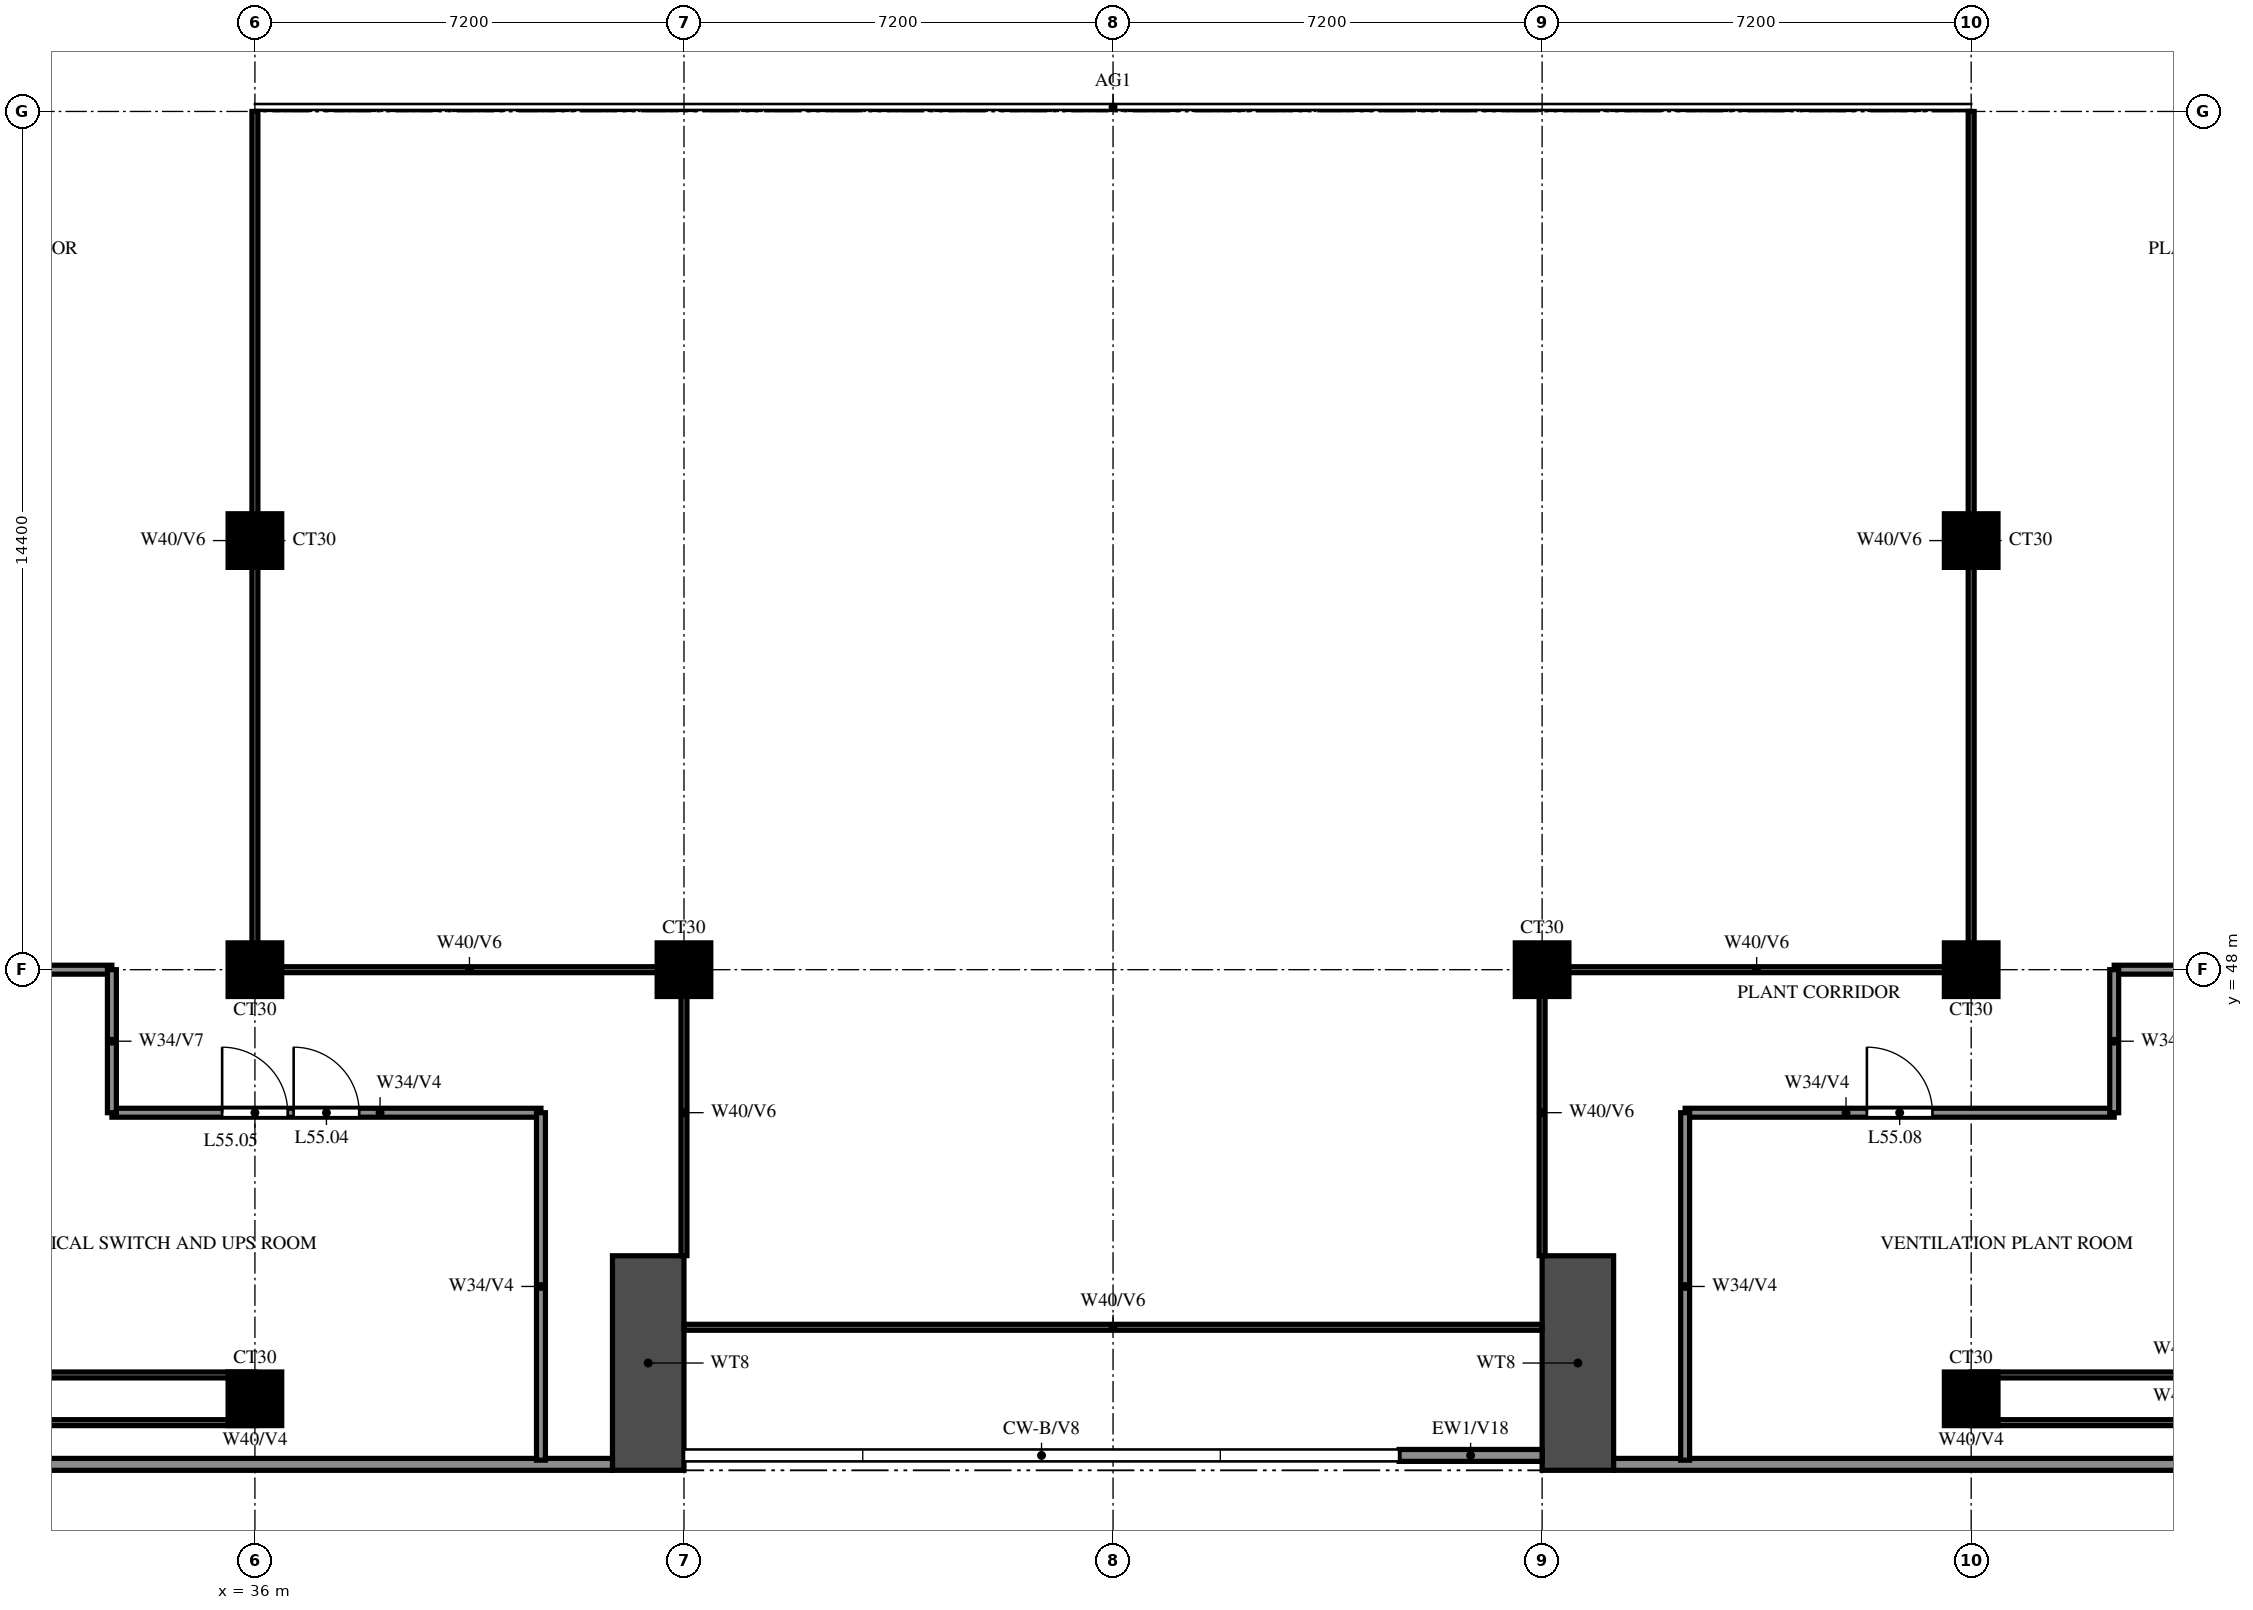
"""IFC4 building model, lengths in metres.
Left out: names, types, materials, properties, quantities, classifications, styles, units other than length and angle.
Written with IfcOpenShell. Run it as: python <this file> out.ifc"""

import sys

from ifc_helpers import new_model, si_unit, direction, frame, frame_2d, origin, origin_2d, place, context, subcontext, project, spatial, rectangle, extrude, source, transform, mapped, element, fill, save


model = new_model("IFC4")
c1 = context("Model", 3, precision=1e-05, world=origin(), true_north=direction((0.0, 1.0)))
c2 = subcontext(c1, "Body", "Model", "MODEL_VIEW")
j1 = project(units=[si_unit("LENGTHUNIT", "METRE"), si_unit("PLANEANGLEUNIT", "RADIAN")], contexts=[c1])
p1 = place(None, origin())
s1 = spatial("IfcSite", under=j1, at=p1, CompositionType="ELEMENT")
p2 = place(p1, origin())
s2 = spatial("IfcBuilding", under=s1, at=p2, CompositionType="ELEMENT")
p3 = place(p2, frame((0.0, 0.0, 206.0)))
s3 = spatial("IfcBuildingStorey", under=s2, at=p3, CompositionType="ELEMENT", Elevation=206.0)
m1 = source(origin(), c2, "Body", "SweptSolid", [
    extrude(rectangle(XDim=0.9, YDim=0.9, at=origin_2d()), origin(), (0.0, 0.0, 1.0), 5.22),
])
for number, where, z_axis, x_axis in (
    (1, (36.0, 40.8, 0.0), (0.0, 0.0, 1.0), (1.0, 0.0, 0.0)),
    (2, (64.8, 40.8, 0.0), (0.0, 0.0, 1.0), (1.0, 0.0, 0.0)),
    (3, (36.0, 48.0, 0.0), (0.0, 0.0, 1.0), (1.0, 0.0, 0.0)),
    (4, (43.2, 48.0, 0.0), (0.0, 0.0, 1.0), (1.0, 0.0, 0.0)),
    (5, (57.6, 48.0, 0.0), (0.0, 0.0, 1.0), (1.0, 0.0, 0.0)),
    (6, (64.8, 48.0, 0.0), (0.0, 0.0, 1.0), (1.0, 0.0, 0.0)),
    (7, (36.0, 55.2, 0.0), (0.0, 0.0, 1.0), (1.0, 0.0, 0.0)),
    (8, (64.8, 55.2, 0.0), (0.0, 0.0, 1.0), (1.0, 0.0, 0.0)),
):
    element("IfcColumn", number, at=place(p3, frame(where, z_axis=z_axis, x_axis=x_axis)), inside=s3, PredefinedType="COLUMN", context=c2, shape_type="MappedRepresentation", body=[
        mapped(m1, transform((0.0, 0.0, 0.0))),
    ])
for number, where, z_axis, x_axis in (
    (9, (42.6, 39.6, 0.0), (0.0, 0.0, 1.0), (0.0, 1.0, 0.0)),
    (10, (58.2, 39.6, 0.0), (0.0, 0.0, 1.0), (0.0, 1.0, 0.0)),
):
    element("IfcWall", number, at=place(p3, frame(where, z_axis=z_axis, x_axis=x_axis)), inside=s3, PredefinedType="SHEAR", context=c2, shape_type="SweptSolid", body=[
        extrude(rectangle(XDim=3.6, YDim=1.2, at=frame_2d((1.8, 0.0))), origin(), (0.0, 0.0, 1.0), 5.22),
    ])
p4 = place(p3, frame((18.2, 39.7, 0.0), z_axis=(0.0, 0.0, 1.0), x_axis=(1.0, 0.0, 0.0)))
e11 = element("IfcWall", 11, at=p4, inside=s3, PredefinedType="SOLIDWALL", context=c2, shape_type="SweptSolid", body=[
    extrude(rectangle(XDim=23.8, YDim=0.2, at=frame_2d((11.9, 0.0))), origin(), (0.0, 0.0, 1.0), 5.22),
])
p5 = place(p3, frame((58.8, 39.7, 0.0), z_axis=(0.0, 0.0, 1.0), x_axis=(1.0, 0.0, 0.0)))
e12 = element("IfcWall", 12, at=p5, inside=s3, PredefinedType="SOLIDWALL", context=c2, shape_type="SweptSolid", body=[
    extrude(rectangle(XDim=23.583, YDim=0.2, at=frame_2d((11.792, 0.0))), origin(), (0.0, 0.0, 1.0), 5.22),
])
p6 = place(p3, frame((55.2, 39.85, 0.0), z_axis=(0.0, 0.0, 1.0), x_axis=(1.0, 0.0, 0.0)))
e13 = element("IfcWall", 13, at=p6, inside=s3, PredefinedType="SOLIDWALL", context=c2, shape_type="SweptSolid", body=[
    extrude(rectangle(XDim=2.4, YDim=0.2, at=frame_2d((1.2, 0.0))), origin(), (0.0, 0.0, 1.0), 4.02),
])
p7 = place(p3, frame((21.6, 40.4, 0.0), z_axis=(0.0, 0.0, 1.0), x_axis=(1.0, 0.0, 0.0)))
e14 = element("IfcWall", 14, at=p7, inside=s3, PredefinedType="PARTITIONING", context=c2, shape_type="SweptSolid", body=[
    extrude(rectangle(XDim=14.4, YDim=0.1, at=frame_2d((7.2, 0.0))), origin(), (0.0, 0.0, 1.0), 3.72),
])
p8 = place(p3, frame((64.8, 40.4, 0.0), z_axis=(0.0, 0.0, 1.0), x_axis=(1.0, 0.0, 0.0)))
e15 = element("IfcWall", 15, at=p8, inside=s3, PredefinedType="PARTITIONING", context=c2, shape_type="SweptSolid", body=[
    extrude(rectangle(XDim=7.2, YDim=0.1, at=frame_2d((3.6, 0.0))), origin(), (0.0, 0.0, 1.0), 5.22),
])
p9 = place(p3, frame((21.6, 41.2, 0.0), z_axis=(0.0, 0.0, 1.0), x_axis=(1.0, 0.0, 0.0)))
e16 = element("IfcWall", 16, at=p9, inside=s3, PredefinedType="PARTITIONING", context=c2, shape_type="SweptSolid", body=[
    extrude(rectangle(XDim=14.4, YDim=0.1, at=frame_2d((7.2, 0.0))), origin(), (0.0, 0.0, 1.0), 3.72),
])
p10 = place(p3, frame((64.8, 41.2, 0.0), z_axis=(0.0, 0.0, 1.0), x_axis=(1.0, 0.0, 0.0)))
e17 = element("IfcWall", 17, at=p10, inside=s3, PredefinedType="PARTITIONING", context=c2, shape_type="SweptSolid", body=[
    extrude(rectangle(XDim=7.2, YDim=0.1, at=frame_2d((3.6, 0.0))), origin(), (0.0, 0.0, 1.0), 3.72),
])
p11 = place(p3, frame((43.202, 42.0, 0.0), z_axis=(0.0, 0.0, 1.0), x_axis=(1.0, 0.0, 0.0)))
e18 = element("IfcWall", 18, at=p11, inside=s3, PredefinedType="PARTITIONING", context=c2, shape_type="SweptSolid", body=[
    extrude(rectangle(XDim=14.396, YDim=0.1, at=frame_2d((7.198, 0.0))), origin(), (0.0, 0.0, 1.0), 4.32),
])
p12 = place(p3, frame((33.6, 45.6, 0.0), z_axis=(0.0, 0.0, 1.0), x_axis=(1.0, 0.0, 0.0)))
e19 = element("IfcWall", 19, at=p12, inside=s3, PredefinedType="PARTITIONING", context=c2, shape_type="SweptSolid", body=[
    extrude(rectangle(XDim=7.2, YDim=0.15, at=frame_2d((3.6, 0.0))), origin(), (0.0, 0.0, 1.0), 5.22),
])
p13 = place(p12, frame((3.05, 0.0, 0.0)))
e20 = element("IfcOpeningElement", 20, at=p13, cuts=e19, PredefinedType="OPENING", context=c2, shape_type="SweptSolid", body=[
    extrude(rectangle(XDim=1.1, YDim=2.1, at=frame_2d((0.55, 1.05))), frame((0.0, 0.085, 0.0), z_axis=(0.0, -1.0, 0.0), x_axis=(1.0, 0.0, 0.0)), (0.0, 0.0, 1.0), 0.17),
])
p14 = place(p12, frame((1.85, 0.0, 0.0)))
e21 = element("IfcOpeningElement", 21, at=p14, cuts=e19, PredefinedType="OPENING", context=c2, shape_type="SweptSolid", body=[
    extrude(rectangle(XDim=1.1, YDim=2.1, at=frame_2d((0.55, 1.05))), frame((0.0, 0.085, 0.0), z_axis=(0.0, -1.0, 0.0), x_axis=(1.0, 0.0, 0.0)), (0.0, 0.0, 1.0), 0.17),
])
p15 = place(p3, frame((60.0, 45.6, 0.0), z_axis=(0.0, 0.0, 1.0), x_axis=(1.0, 0.0, 0.0)))
e22 = element("IfcWall", 22, at=p15, inside=s3, PredefinedType="PARTITIONING", context=c2, shape_type="SweptSolid", body=[
    extrude(rectangle(XDim=7.2, YDim=0.15, at=frame_2d((3.6, 0.0))), origin(), (0.0, 0.0, 1.0), 5.22),
])
p16 = place(p15, frame((3.05, 0.0, 0.0)))
e23 = element("IfcOpeningElement", 23, at=p16, cuts=e22, PredefinedType="OPENING", context=c2, shape_type="SweptSolid", body=[
    extrude(rectangle(XDim=1.1, YDim=2.1, at=frame_2d((0.55, 1.05))), frame((0.0, 0.085, 0.0), z_axis=(0.0, -1.0, 0.0), x_axis=(1.0, 0.0, 0.0)), (0.0, 0.0, 1.0), 0.17),
])
for number, where, z_axis, x_axis in (
    (24, (36.0, 48.0, 0.0), (0.0, 0.0, 1.0), (1.0, 0.0, 0.0)),
    (25, (57.6, 48.0, 0.0), (0.0, 0.0, 1.0), (1.0, 0.0, 0.0)),
):
    element("IfcWall", number, at=place(p3, frame(where, z_axis=z_axis, x_axis=x_axis)), inside=s3, PredefinedType="PARTITIONING", context=c2, shape_type="SweptSolid", body=[
        extrude(rectangle(XDim=7.2, YDim=0.1, at=frame_2d((3.6, 0.0))), origin(), (0.0, 0.0, 1.0), 4.32),
    ])
p17 = place(p3, frame((15.4, 48.0, 0.0), z_axis=(0.0, 0.0, 1.0), x_axis=(1.0, 0.0, 0.0)))
e26 = element("IfcWall", 26, at=p17, inside=s3, PredefinedType="PARTITIONING", context=c2, shape_type="SweptSolid", body=[
    extrude(rectangle(XDim=18.2, YDim=0.15, at=frame_2d((9.1, 0.0))), origin(), (0.0, 0.0, 1.0), 3.72),
])
p18 = place(p17, frame((4.5, 0.0, 0.0)))
e27 = element("IfcOpeningElement", 27, at=p18, cuts=e26, PredefinedType="OPENING", context=c2, shape_type="SweptSolid", body=[
    extrude(rectangle(XDim=1.1, YDim=2.1, at=frame_2d((0.55, 1.05))), frame((0.0, 0.085, 0.0), z_axis=(0.0, -1.0, 0.0), x_axis=(1.0, 0.0, 0.0)), (0.0, 0.0, 1.0), 0.17),
])
p19 = place(p3, frame((67.2, 48.0, 0.0), z_axis=(0.0, 0.0, 1.0), x_axis=(1.0, 0.0, 0.0)))
e28 = element("IfcWall", 28, at=p19, inside=s3, PredefinedType="PARTITIONING", context=c2, shape_type="SweptSolid", body=[
    extrude(rectangle(XDim=4.63, YDim=0.15, at=frame_2d((2.315, 0.0))), origin(), (0.0, 0.0, 1.0), 5.22),
])
p20 = place(p3, frame((33.6, 45.6, 0.0), z_axis=(0.0, 0.0, 1.0), x_axis=(0.0, 1.0, 0.0)))
e29 = element("IfcWall", 29, at=p20, inside=s3, PredefinedType="PARTITIONING", context=c2, shape_type="SweptSolid", body=[
    extrude(rectangle(XDim=2.4, YDim=0.15, at=frame_2d((1.2, 0.0))), origin(), (0.0, 0.0, 1.0), 4.32),
])
p21 = place(p3, frame((36.0, 40.4, 0.0), z_axis=(0.0, 0.0, 1.0), x_axis=(0.0, 1.0, 0.0)))
e30 = element("IfcWall", 30, at=p21, inside=s3, PredefinedType="PARTITIONING", context=c2, shape_type="SweptSolid", body=[
    extrude(rectangle(XDim=0.8, YDim=0.1, at=frame_2d((0.4, 0.0))), origin(), (0.0, 0.0, 1.0), 5.22),
])
p22 = place(p3, frame((36.0, 48.0, 0.0), z_axis=(0.0, 0.0, 1.0), x_axis=(0.0, 1.0, 0.0)))
e31 = element("IfcWall", 31, at=p22, inside=s3, PredefinedType="PARTITIONING", context=c2, shape_type="SweptSolid", body=[
    extrude(rectangle(XDim=14.4, YDim=0.1, at=frame_2d((7.2, 0.0))), origin(), (0.0, 0.0, 1.0), 4.32),
])
p23 = place(p3, frame((40.8, 39.77, 0.0), z_axis=(0.0, 0.0, 1.0), x_axis=(0.0, 1.0, 0.0)))
e32 = element("IfcWall", 32, at=p23, inside=s3, PredefinedType="PARTITIONING", context=c2, shape_type="SweptSolid", body=[
    extrude(rectangle(XDim=5.83, YDim=0.15, at=frame_2d((2.915, 0.0))), origin(), (0.0, 0.0, 1.0), 5.22),
])
for number, where, z_axis, x_axis in (
    (33, (43.2, 43.202, 0.0), (0.0, 0.0, 1.0), (0.0, 1.0, 0.0)),
    (34, (57.6, 43.202, 0.0), (0.0, 0.0, 1.0), (0.0, 1.0, 0.0)),
):
    element("IfcWall", number, at=place(p3, frame(where, z_axis=z_axis, x_axis=x_axis)), inside=s3, PredefinedType="PARTITIONING", context=c2, shape_type="SweptSolid", body=[
        extrude(rectangle(XDim=4.798, YDim=0.1, at=frame_2d((2.399, 0.0))), origin(), (0.0, 0.0, 1.0), 4.32),
    ])
p24 = place(p3, frame((60.0, 39.77, 0.0), z_axis=(0.0, 0.0, 1.0), x_axis=(0.0, 1.0, 0.0)))
e35 = element("IfcWall", 35, at=p24, inside=s3, PredefinedType="PARTITIONING", context=c2, shape_type="SweptSolid", body=[
    extrude(rectangle(XDim=5.83, YDim=0.15, at=frame_2d((2.915, 0.0))), origin(), (0.0, 0.0, 1.0), 5.22),
])
p25 = place(p3, frame((64.8, 40.4, 0.0), z_axis=(0.0, 0.0, 1.0), x_axis=(0.0, 1.0, 0.0)))
e36 = element("IfcWall", 36, at=p25, inside=s3, PredefinedType="PARTITIONING", context=c2, shape_type="SweptSolid", body=[
    extrude(rectangle(XDim=0.8, YDim=0.1, at=frame_2d((0.4, 0.0))), origin(), (0.0, 0.0, 1.0), 5.22),
])
p26 = place(p3, frame((64.8, 48.0, 0.0), z_axis=(0.0, 0.0, 1.0), x_axis=(0.0, 1.0, 0.0)))
e37 = element("IfcWall", 37, at=p26, inside=s3, PredefinedType="PARTITIONING", context=c2, shape_type="SweptSolid", body=[
    extrude(rectangle(XDim=14.4, YDim=0.1, at=frame_2d((7.2, 0.0))), origin(), (0.0, 0.0, 1.0), 4.32),
])
p27 = place(p3, frame((67.2, 45.6, 0.0), z_axis=(0.0, 0.0, 1.0), x_axis=(0.0, 1.0, 0.0)))
e38 = element("IfcWall", 38, at=p27, inside=s3, PredefinedType="PARTITIONING", context=c2, shape_type="SweptSolid", body=[
    extrude(rectangle(XDim=2.4, YDim=0.15, at=frame_2d((1.2, 0.0))), origin(), (0.0, 0.0, 1.0), 5.22),
])
p28 = place(p13, origin())
e39 = element("IfcDoor", 39, at=p28, inside=s3, OperationType="SINGLE_SWING_RIGHT", PredefinedType="DOOR", context=c2, shape_type="SweptSolid", body=[
    extrude(rectangle(XDim=1.1, YDim=2.1, at=frame_2d((0.55, 1.05))), frame((0.0, 0.025, 0.0), z_axis=(0.0, -1.0, 0.0), x_axis=(1.0, 0.0, 0.0)), (0.0, 0.0, 1.0), 0.05),
])
fill(e20, e39)
p29 = place(p14, origin())
e40 = element("IfcDoor", 40, at=p29, inside=s3, OperationType="SINGLE_SWING_LEFT", PredefinedType="DOOR", context=c2, shape_type="SweptSolid", body=[
    extrude(rectangle(XDim=1.1, YDim=2.1, at=frame_2d((0.55, 1.05))), frame((0.0, 0.025, 0.0), z_axis=(0.0, -1.0, 0.0), x_axis=(1.0, 0.0, 0.0)), (0.0, 0.0, 1.0), 0.05),
])
fill(e21, e40)
p30 = place(p16, origin())
e41 = element("IfcDoor", 41, at=p30, inside=s3, OperationType="SINGLE_SWING_RIGHT", PredefinedType="DOOR", context=c2, shape_type="SweptSolid", body=[
    extrude(rectangle(XDim=1.1, YDim=2.1, at=frame_2d((0.55, 1.05))), frame((0.0, 0.025, 0.0), z_axis=(0.0, -1.0, 0.0), x_axis=(1.0, 0.0, 0.0)), (0.0, 0.0, 1.0), 0.05),
])
fill(e23, e41)
save(model, sys.argv[1])
